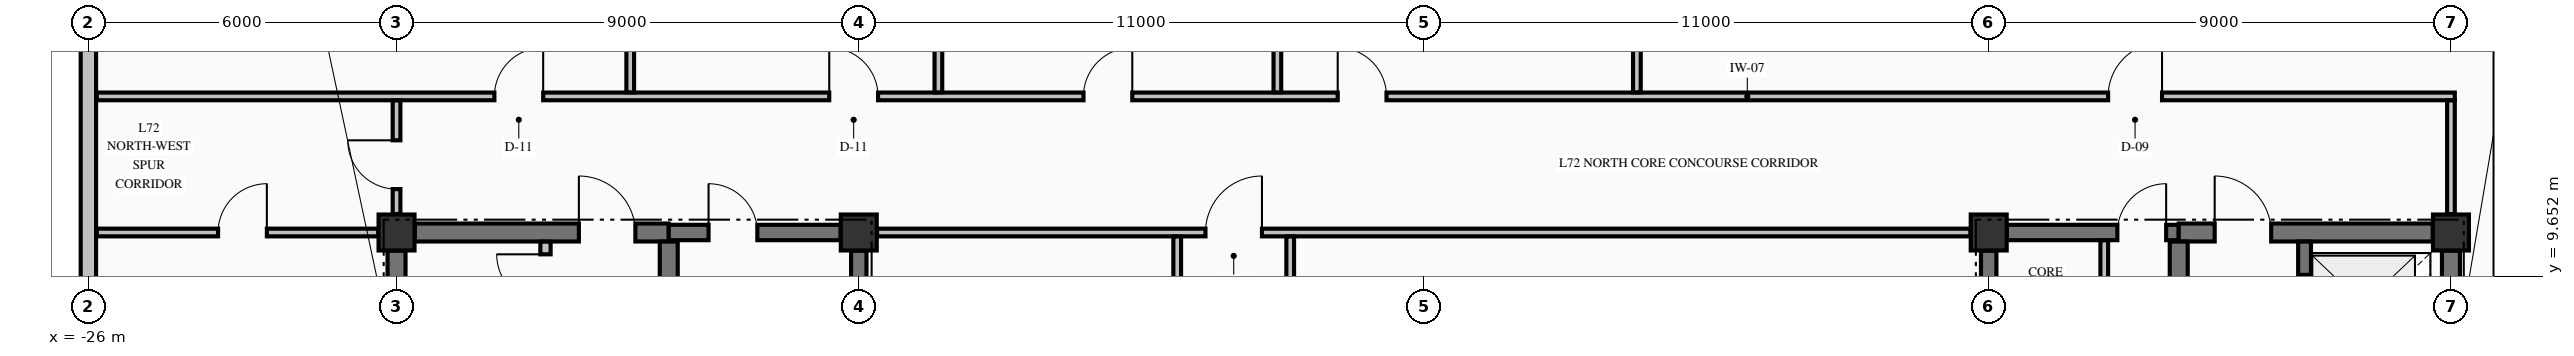
"""IFC4 building model, lengths in metres.
Left out: names, types, materials, properties, quantities, classifications, styles, units other than length and angle.
Written with IfcOpenShell. Run it as: python <this file> out.ifc"""

import sys

from ifc_helpers import new_model, si_unit, direction, frame, frame_2d, origin, origin_2d, place, context, subcontext, project, spatial, rectangle, extrude, element, fill, save


model = new_model("IFC4")
c1 = context("Model", 3, precision=1e-05, world=origin(), true_north=direction((0.0, 1.0)))
c2 = subcontext(c1, "Body", "Model", "MODEL_VIEW")
j1 = project(units=[si_unit("LENGTHUNIT", "METRE"), si_unit("PLANEANGLEUNIT", "RADIAN")], contexts=[c1])
p1 = place(None, origin())
s1 = spatial("IfcSite", under=j1, at=p1, CompositionType="ELEMENT")
p2 = place(p1, origin())
s2 = spatial("IfcBuilding", under=s1, at=p2, CompositionType="ELEMENT")
p3 = place(p2, frame((0.0, 0.0, 270.58)))
s3 = spatial("IfcBuildingStorey", under=s2, at=p3, CompositionType="ELEMENT", Elevation=270.58)
for number, where, z_axis, x_axis in (
    (1, (-20.0, 10.5, -0.325), (0.0, 0.0, 1.0), (1.0, 0.0, 0.0)),
    (2, (-11.0, 10.5, -0.325), (0.0, 0.0, 1.0), (1.0, 0.0, 0.0)),
    (3, (11.0, 10.5, -0.325), (0.0, 0.0, 1.0), (1.0, 0.0, 0.0)),
    (4, (20.0, 10.5, -0.325), (0.0, 0.0, 1.0), (1.0, 0.0, 0.0)),
):
    element("IfcColumn", number, at=place(p3, frame(where, z_axis=z_axis, x_axis=x_axis)), inside=s3, PredefinedType="COLUMN", context=c2, shape_type="SweptSolid", body=[
        extrude(rectangle(XDim=0.7, YDim=0.7, at=origin_2d()), origin(), (0.0, 0.0, 1.0), 3.815),
    ])
for number, where, z_axis, x_axis in (
    (5, (21.0, 9.455, 0.0), (0.0, 0.0, 1.0), (0.0, 1.0, 0.0)),
    (6, (-26.0, 17.545, 0.0), (0.0, 0.0, 1.0), (0.0, -1.0, 0.0)),
):
    element("IfcWall", number, at=place(p3, frame(where, z_axis=z_axis, x_axis=x_axis)), inside=s3, PredefinedType="STANDARD", context=c2, shape_type="SweptSolid", body=[
        extrude(rectangle(XDim=8.09, YDim=0.3, at=frame_2d((4.045, 0.0))), origin(), (0.0, 0.0, 1.0), 2.882),
    ])
p4 = place(p3, frame((-19.646, 10.5, 0.0), z_axis=(0.0, 0.0, 1.0), x_axis=(1.0, 0.0, 0.0)))
e7 = element("IfcWall", 7, at=p4, inside=s3, PredefinedType="SHEAR", context=c2, shape_type="SweptSolid", body=[
    extrude(rectangle(XDim=4.946, YDim=0.35, at=frame_2d((2.473, 0.0))), origin(), (0.0, 0.0, 1.0), 3.49),
])
p5 = place(p4, frame((3.196, 0.0, 0.0)))
e8 = element("IfcOpeningElement", 8, at=p5, cuts=e7, PredefinedType="OPENING", context=c2, shape_type="SweptSolid", body=[
    extrude(rectangle(XDim=1.1, YDim=2.15, at=frame_2d((0.55, 1.075))), frame((0.0, 0.185, 0.0), z_axis=(0.0, -1.0, 0.0), x_axis=(1.0, 0.0, 0.0)), (0.0, 0.0, 1.0), 0.37),
])
p6 = place(p3, frame((-14.7, 10.5, 0.0), z_axis=(0.0, 0.0, 1.0), x_axis=(1.0, 0.0, 0.0)))
e9 = element("IfcWall", 9, at=p6, inside=s3, PredefinedType="SHEAR", context=c2, shape_type="SweptSolid", body=[
    extrude(rectangle(XDim=3.346, YDim=0.3, at=frame_2d((1.673, 0.0))), origin(), (0.0, 0.0, 1.0), 3.49),
])
p7 = place(p6, frame((0.775, 0.0, 0.0)))
e10 = element("IfcOpeningElement", 10, at=p7, cuts=e9, PredefinedType="OPENING", context=c2, shape_type="SweptSolid", body=[
    extrude(rectangle(XDim=0.95, YDim=2.15, at=frame_2d((0.475, 1.075))), frame((0.0, 0.16, 0.0), z_axis=(0.0, -1.0, 0.0), x_axis=(1.0, 0.0, 0.0)), (0.0, 0.0, 1.0), 0.32),
])
p8 = place(p3, frame((11.354, 10.5, 0.0), z_axis=(0.0, 0.0, 1.0), x_axis=(1.0, 0.0, 0.0)))
e11 = element("IfcWall", 11, at=p8, inside=s3, PredefinedType="SHEAR", context=c2, shape_type="SweptSolid", body=[
    extrude(rectangle(XDim=3.346, YDim=0.3, at=frame_2d((1.673, 0.0))), origin(), (0.0, 0.0, 1.0), 3.49),
])
p9 = place(p8, frame((2.151, 0.0, 0.0)))
e12 = element("IfcOpeningElement", 12, at=p9, cuts=e11, PredefinedType="OPENING", context=c2, shape_type="SweptSolid", body=[
    extrude(rectangle(XDim=0.95, YDim=2.15, at=frame_2d((0.475, 1.075))), frame((0.0, 0.16, 0.0), z_axis=(0.0, -1.0, 0.0), x_axis=(1.0, 0.0, 0.0)), (0.0, 0.0, 1.0), 0.32),
])
p10 = place(p3, frame((14.7, 10.5, 0.0), z_axis=(0.0, 0.0, 1.0), x_axis=(1.0, 0.0, 0.0)))
e13 = element("IfcWall", 13, at=p10, inside=s3, PredefinedType="SHEAR", context=c2, shape_type="SweptSolid", body=[
    extrude(rectangle(XDim=4.946, YDim=0.35, at=frame_2d((2.473, 0.0))), origin(), (0.0, 0.0, 1.0), 3.49),
])
p11 = place(p10, frame((0.7, 0.0, 0.0)))
e14 = element("IfcOpeningElement", 14, at=p11, cuts=e13, PredefinedType="OPENING", context=c2, shape_type="SweptSolid", body=[
    extrude(rectangle(XDim=1.1, YDim=2.15, at=frame_2d((0.55, 1.075))), frame((0.0, 0.185, 0.0), z_axis=(0.0, -1.0, 0.0), x_axis=(1.0, 0.0, 0.0)), (0.0, 0.0, 1.0), 0.37),
])
p12 = place(p3, frame((-25.835, 10.5, 0.0), z_axis=(0.0, 0.0, 1.0), x_axis=(1.0, 0.0, 0.0)))
e15 = element("IfcWall", 15, at=p12, inside=s3, PredefinedType="PARTITIONING", context=c2, shape_type="SweptSolid", body=[
    extrude(rectangle(XDim=5.479, YDim=0.15, at=frame_2d((2.74, 0.0))), origin(), (0.0, 0.0, 1.0), 3.49),
])
p13 = place(p12, frame((2.36, 0.0, 0.0)))
e16 = element("IfcOpeningElement", 16, at=p13, cuts=e15, PredefinedType="OPENING", context=c2, shape_type="SweptSolid", body=[
    extrude(rectangle(XDim=0.95, YDim=2.15, at=frame_2d((0.475, 1.075))), frame((0.0, 0.085, 0.0), z_axis=(0.0, -1.0, 0.0), x_axis=(1.0, 0.0, 0.0)), (0.0, 0.0, 1.0), 0.17),
])
p14 = place(p3, frame((-10.644, 10.5, 0.0), z_axis=(0.0, 0.0, 1.0), x_axis=(1.0, 0.0, 0.0)))
e17 = element("IfcWall", 17, at=p14, inside=s3, PredefinedType="PARTITIONING", context=c2, shape_type="SweptSolid", body=[
    extrude(rectangle(XDim=21.288, YDim=0.15, at=frame_2d((10.644, 0.0))), origin(), (0.0, 0.0, 1.0), 3.49),
])
p15 = place(p14, frame((6.394, 0.0, 0.0)))
e18 = element("IfcOpeningElement", 18, at=p15, cuts=e17, PredefinedType="OPENING", context=c2, shape_type="SweptSolid", body=[
    extrude(rectangle(XDim=1.1, YDim=2.15, at=frame_2d((0.55, 1.075))), frame((0.0, 0.085, 0.0), z_axis=(0.0, -1.0, 0.0), x_axis=(1.0, 0.0, 0.0)), (0.0, 0.0, 1.0), 0.17),
])
p16 = place(p3, frame((-25.835, 13.15, 0.0), z_axis=(0.0, 0.0, 1.0), x_axis=(1.0, 0.0, 0.0)))
e19 = element("IfcWall", 19, at=p16, inside=s3, PredefinedType="PARTITIONING", context=c2, shape_type="SweptSolid", body=[
    extrude(rectangle(XDim=45.91, YDim=0.15, at=frame_2d((22.955, 0.0))), origin(), (0.0, 0.0, 1.0), 3.49),
])
p17 = place(p16, frame((7.74, 0.0, 0.0)))
e20 = element("IfcOpeningElement", 20, at=p17, cuts=e19, PredefinedType="OPENING", context=c2, shape_type="SweptSolid", body=[
    extrude(rectangle(XDim=0.95, YDim=2.15, at=frame_2d((0.475, 1.075))), frame((0.0, 0.085, 0.0), z_axis=(0.0, -1.0, 0.0), x_axis=(1.0, 0.0, 0.0)), (0.0, 0.0, 1.0), 0.17),
])
p18 = place(p16, frame((14.26, 0.0, 0.0)))
e21 = element("IfcOpeningElement", 21, at=p18, cuts=e19, PredefinedType="OPENING", context=c2, shape_type="SweptSolid", body=[
    extrude(rectangle(XDim=0.95, YDim=2.15, at=frame_2d((0.475, 1.075))), frame((0.0, 0.085, 0.0), z_axis=(0.0, -1.0, 0.0), x_axis=(1.0, 0.0, 0.0)), (0.0, 0.0, 1.0), 0.17),
])
p19 = place(p16, frame((19.21, 0.0, 0.0)))
e22 = element("IfcOpeningElement", 22, at=p19, cuts=e19, PredefinedType="OPENING", context=c2, shape_type="SweptSolid", body=[
    extrude(rectangle(XDim=0.95, YDim=2.15, at=frame_2d((0.475, 1.075))), frame((0.0, 0.085, 0.0), z_axis=(0.0, -1.0, 0.0), x_axis=(1.0, 0.0, 0.0)), (0.0, 0.0, 1.0), 0.17),
])
p20 = place(p16, frame((24.16, 0.0, 0.0)))
e23 = element("IfcOpeningElement", 23, at=p20, cuts=e19, PredefinedType="OPENING", context=c2, shape_type="SweptSolid", body=[
    extrude(rectangle(XDim=0.95, YDim=2.15, at=frame_2d((0.475, 1.075))), frame((0.0, 0.085, 0.0), z_axis=(0.0, -1.0, 0.0), x_axis=(1.0, 0.0, 0.0)), (0.0, 0.0, 1.0), 0.17),
])
p21 = place(p16, frame((39.16, 0.0, 0.0)))
e24 = element("IfcOpeningElement", 24, at=p21, cuts=e19, PredefinedType="OPENING", context=c2, shape_type="SweptSolid", body=[
    extrude(rectangle(XDim=1.05, YDim=2.15, at=frame_2d((0.525, 1.075))), frame((0.0, 0.085, 0.0), z_axis=(0.0, -1.0, 0.0), x_axis=(1.0, 0.0, 0.0)), (0.0, 0.0, 1.0), 0.17),
])
p22 = place(p3, frame((-20.0, 5.327, 0.0), z_axis=(0.0, 0.0, 1.0), x_axis=(0.0, 1.0, 0.0)))
e25 = element("IfcWall", 25, at=p22, inside=s3, PredefinedType="SHEAR", context=c2, shape_type="SweptSolid", body=[
    extrude(rectangle(XDim=4.819, YDim=0.35, at=frame_2d((2.41, 0.0))), origin(), (0.0, 0.0, 1.0), 3.49),
])
p23 = place(p3, frame((-14.7, 5.852, 0.0), z_axis=(0.0, 0.0, 1.0), x_axis=(0.0, 1.0, 0.0)))
e26 = element("IfcWall", 26, at=p23, inside=s3, PredefinedType="SHEAR", context=c2, shape_type="SweptSolid", body=[
    extrude(rectangle(XDim=4.471, YDim=0.35, at=frame_2d((2.235, 0.0))), origin(), (0.0, 0.0, 1.0), 3.49),
])
for number, where, z_axis, x_axis in (
    (27, (-11.0, 5.852, 0.0), (0.0, 0.0, 1.0), (0.0, 1.0, 0.0)),
    (28, (11.0, 5.852, 0.0), (0.0, 0.0, 1.0), (0.0, 1.0, 0.0)),
):
    element("IfcWall", number, at=place(p3, frame(where, z_axis=z_axis, x_axis=x_axis)), inside=s3, PredefinedType="SHEAR", context=c2, shape_type="SweptSolid", body=[
        extrude(rectangle(XDim=4.294, YDim=0.3, at=frame_2d((2.147, 0.0))), origin(), (0.0, 0.0, 1.0), 3.49),
    ])
p24 = place(p3, frame((14.7, 5.852, 0.0), z_axis=(0.0, 0.0, 1.0), x_axis=(0.0, 1.0, 0.0)))
e29 = element("IfcWall", 29, at=p24, inside=s3, PredefinedType="SHEAR", context=c2, shape_type="SweptSolid", body=[
    extrude(rectangle(XDim=4.471, YDim=0.35, at=frame_2d((2.235, 0.0))), origin(), (0.0, 0.0, 1.0), 3.49),
])
p25 = place(p3, frame((17.15, 7.877, 0.0), z_axis=(0.0, 0.0, 1.0), x_axis=(0.0, 1.0, 0.0)))
e30 = element("IfcWall", 30, at=p25, inside=s3, PredefinedType="SOLIDWALL", context=c2, shape_type="SweptSolid", body=[
    extrude(rectangle(XDim=2.446, YDim=0.25, at=frame_2d((1.223, 0.0))), origin(), (0.0, 0.0, 1.0), 3.49),
])
p26 = place(p25, frame((0.698, 0.0, 0.0)))
e31 = element("IfcOpeningElement", 31, at=p26, cuts=e30, PredefinedType="OPENING", context=c2, shape_type="SweptSolid", body=[
    extrude(rectangle(XDim=1.1, YDim=2.2, at=frame_2d((0.55, 1.1))), frame((0.0, 0.135, 0.0), z_axis=(0.0, -1.0, 0.0), x_axis=(1.0, 0.0, 0.0)), (0.0, 0.0, 1.0), 0.27),
])
p27 = place(p3, frame((20.0, 7.877, 0.0), z_axis=(0.0, 0.0, 1.0), x_axis=(0.0, 1.0, 0.0)))
e32 = element("IfcWall", 32, at=p27, inside=s3, PredefinedType="SHEAR", context=c2, shape_type="SweptSolid", body=[
    extrude(rectangle(XDim=2.269, YDim=0.35, at=frame_2d((1.135, 0.0))), origin(), (0.0, 0.0, 1.0), 3.49),
])
p28 = place(p3, frame((-20.0, 10.856, 0.0), z_axis=(0.0, 0.0, 1.0), x_axis=(0.0, 1.0, 0.0)))
e33 = element("IfcWall", 33, at=p28, inside=s3, PredefinedType="PARTITIONING", context=c2, shape_type="SweptSolid", body=[
    extrude(rectangle(XDim=2.216, YDim=0.15, at=frame_2d((1.108, 0.0))), origin(), (0.0, 0.0, 1.0), 3.49),
])
p29 = place(p28, frame((0.489, 0.0, 0.0)))
e34 = element("IfcOpeningElement", 34, at=p29, cuts=e33, PredefinedType="OPENING", context=c2, shape_type="SweptSolid", body=[
    extrude(rectangle(XDim=0.95, YDim=2.15, at=frame_2d((0.475, 1.075))), frame((0.0, 0.085, 0.0), z_axis=(0.0, -1.0, 0.0), x_axis=(1.0, 0.0, 0.0)), (0.0, 0.0, 1.0), 0.17),
])
p30 = place(p3, frame((-17.1, 8.778, 0.0), z_axis=(0.0, 0.0, 1.0), x_axis=(0.0, 1.0, 0.0)))
e35 = element("IfcWall", 35, at=p30, inside=s3, PredefinedType="PARTITIONING", context=c2, shape_type="SweptSolid", body=[
    extrude(rectangle(XDim=1.544, YDim=0.2, at=frame_2d((0.772, 0.0))), origin(), (0.0, 0.0, 1.0), 3.49),
])
p31 = place(p30, frame((0.347, 0.0, 0.0)))
e36 = element("IfcOpeningElement", 36, at=p31, cuts=e35, PredefinedType="OPENING", context=c2, shape_type="SweptSolid", body=[
    extrude(rectangle(XDim=0.95, YDim=2.15, at=frame_2d((0.475, 1.075))), frame((0.0, 0.11, 0.0), z_axis=(0.0, -1.0, 0.0), x_axis=(1.0, 0.0, 0.0)), (0.0, 0.0, 1.0), 0.22),
])
for number, where, z_axis, x_axis in (
    (37, (-15.45, 13.228, 0.0), (0.0, 0.0, 1.0), (0.0, 1.0, 0.0)),
    (38, (-9.45, 13.228, 0.0), (0.0, 0.0, 1.0), (0.0, 1.0, 0.0)),
):
    element("IfcWall", number, at=place(p3, frame(where, z_axis=z_axis, x_axis=x_axis)), inside=s3, PredefinedType="PARTITIONING", context=c2, shape_type="SweptSolid", body=[
        extrude(rectangle(XDim=10.107, YDim=0.15, at=frame_2d((5.053, 0.0))), origin(), (0.0, 0.0, 1.0), 3.49),
    ])
p32 = place(p3, frame((-4.8, 2.978, 0.0), z_axis=(0.0, 0.0, 1.0), x_axis=(0.0, 1.0, 0.0)))
e39 = element("IfcWall", 39, at=p32, inside=s3, PredefinedType="PARTITIONING", context=c2, shape_type="SweptSolid", body=[
    extrude(rectangle(XDim=7.444, YDim=0.15, at=frame_2d((3.722, 0.0))), origin(), (0.0, 0.0, 1.0), 3.49),
])
p33 = place(p3, frame((-2.85, 13.228, 0.0), z_axis=(0.0, 0.0, 1.0), x_axis=(0.0, 1.0, 0.0)))
e40 = element("IfcWall", 40, at=p33, inside=s3, PredefinedType="PARTITIONING", context=c2, shape_type="SweptSolid", body=[
    extrude(rectangle(XDim=10.107, YDim=0.15, at=frame_2d((5.053, 0.0))), origin(), (0.0, 0.0, 1.0), 3.49),
])
p34 = place(p3, frame((-2.6, 2.978, 0.0), z_axis=(0.0, 0.0, 1.0), x_axis=(0.0, 1.0, 0.0)))
e41 = element("IfcWall", 41, at=p34, inside=s3, PredefinedType="PARTITIONING", context=c2, shape_type="SweptSolid", body=[
    extrude(rectangle(XDim=7.444, YDim=0.15, at=frame_2d((3.722, 0.0))), origin(), (0.0, 0.0, 1.0), 3.49),
])
p35 = place(p3, frame((4.15, 13.228, 0.0), z_axis=(0.0, 0.0, 1.0), x_axis=(0.0, 1.0, 0.0)))
e42 = element("IfcWall", 42, at=p35, inside=s3, PredefinedType="PARTITIONING", context=c2, shape_type="SweptSolid", body=[
    extrude(rectangle(XDim=10.107, YDim=0.15, at=frame_2d((5.053, 0.0))), origin(), (0.0, 0.0, 1.0), 3.49),
])
p36 = place(p3, frame((13.25, 5.853, 0.0), z_axis=(0.0, 0.0, 1.0), x_axis=(0.0, 1.0, 0.0)))
e43 = element("IfcWall", 43, at=p36, inside=s3, PredefinedType="PARTITIONING", context=c2, shape_type="SweptSolid", body=[
    extrude(rectangle(XDim=4.494, YDim=0.15, at=frame_2d((2.247, 0.0))), origin(), (0.0, 0.0, 1.0), 3.49),
])
p37 = place(p36, frame((1.472, 0.0, 0.0)))
e44 = element("IfcOpeningElement", 44, at=p37, cuts=e43, PredefinedType="OPENING", context=c2, shape_type="SweptSolid", body=[
    extrude(rectangle(XDim=0.95, YDim=2.15, at=frame_2d((0.475, 1.075))), frame((0.0, 0.085, 0.0), z_axis=(0.0, -1.0, 0.0), x_axis=(1.0, 0.0, 0.0)), (0.0, 0.0, 1.0), 0.17),
])
p38 = place(p3, frame((20.0, 10.856, 0.0), z_axis=(0.0, 0.0, 1.0), x_axis=(0.0, 1.0, 0.0)))
e45 = element("IfcWall", 45, at=p38, inside=s3, PredefinedType="PARTITIONING", context=c2, shape_type="SweptSolid", body=[
    extrude(rectangle(XDim=2.216, YDim=0.15, at=frame_2d((1.108, 0.0))), origin(), (0.0, 0.0, 1.0), 3.08),
])
p39 = place(p7, origin())
e46 = element("IfcDoor", 46, at=p39, inside=s3, OperationType="SINGLE_SWING_LEFT", PredefinedType="DOOR", context=c2, shape_type="SweptSolid", body=[
    extrude(rectangle(XDim=0.95, YDim=2.15, at=frame_2d((0.475, 1.075))), frame((0.0, 0.025, 0.0), z_axis=(0.0, -1.0, 0.0), x_axis=(1.0, 0.0, 0.0)), (0.0, 0.0, 1.0), 0.05),
])
fill(e10, e46)
p40 = place(p9, origin())
e47 = element("IfcDoor", 47, at=p40, inside=s3, OperationType="SINGLE_SWING_RIGHT", PredefinedType="DOOR", context=c2, shape_type="SweptSolid", body=[
    extrude(rectangle(XDim=0.95, YDim=2.15, at=frame_2d((0.475, 1.075))), frame((0.0, 0.025, 0.0), z_axis=(0.0, -1.0, 0.0), x_axis=(1.0, 0.0, 0.0)), (0.0, 0.0, 1.0), 0.05),
])
fill(e12, e47)
p41 = place(p5, origin())
e48 = element("IfcDoor", 48, at=p41, inside=s3, OperationType="SINGLE_SWING_LEFT", PredefinedType="DOOR", context=c2, shape_type="SweptSolid", body=[
    extrude(rectangle(XDim=1.1, YDim=2.15, at=frame_2d((0.55, 1.075))), frame((0.0, 0.025, 0.0), z_axis=(0.0, -1.0, 0.0), x_axis=(1.0, 0.0, 0.0)), (0.0, 0.0, 1.0), 0.05),
])
fill(e8, e48)
p42 = place(p31, origin())
e49 = element("IfcDoor", 49, at=p42, inside=s3, OperationType="SINGLE_SWING_RIGHT", PredefinedType="DOOR", context=c2, shape_type="SweptSolid", body=[
    extrude(rectangle(XDim=0.95, YDim=2.15, at=frame_2d((0.475, 1.075))), frame((0.0, 0.025, 0.0), z_axis=(0.0, -1.0, 0.0), x_axis=(1.0, 0.0, 0.0)), (0.0, 0.0, 1.0), 0.05),
])
fill(e36, e49)
p43 = place(p26, origin())
e50 = element("IfcDoor", 50, at=p43, inside=s3, OperationType="SLIDING_TO_RIGHT", PredefinedType="DOOR", context=c2, shape_type="SweptSolid", body=[
    extrude(rectangle(XDim=1.1, YDim=2.2, at=frame_2d((0.55, 1.1))), frame((0.0, 0.025, 0.0), z_axis=(0.0, -1.0, 0.0), x_axis=(1.0, 0.0, 0.0)), (0.0, 0.0, 1.0), 0.05),
])
fill(e31, e50)
p44 = place(p11, origin())
e51 = element("IfcDoor", 51, at=p44, inside=s3, OperationType="SINGLE_SWING_LEFT", PredefinedType="DOOR", context=c2, shape_type="SweptSolid", body=[
    extrude(rectangle(XDim=1.1, YDim=2.15, at=frame_2d((0.55, 1.075))), frame((0.0, 0.025, 0.0), z_axis=(0.0, -1.0, 0.0), x_axis=(1.0, 0.0, 0.0)), (0.0, 0.0, 1.0), 0.05),
])
fill(e14, e51)
p45 = place(p15, origin())
e52 = element("IfcDoor", 52, at=p45, inside=s3, OperationType="SINGLE_SWING_RIGHT", PredefinedType="DOOR", context=c2, shape_type="SweptSolid", body=[
    extrude(rectangle(XDim=1.1, YDim=2.15, at=frame_2d((0.55, 1.075))), frame((0.0, 0.025, 0.0), z_axis=(0.0, -1.0, 0.0), x_axis=(1.0, 0.0, 0.0)), (0.0, 0.0, 1.0), 0.05),
])
fill(e18, e52)
p46 = place(p17, origin())
e53 = element("IfcDoor", 53, at=p46, inside=s3, OperationType="SINGLE_SWING_RIGHT", PredefinedType="DOOR", context=c2, shape_type="SweptSolid", body=[
    extrude(rectangle(XDim=0.95, YDim=2.15, at=frame_2d((0.475, 1.075))), frame((0.0, 0.025, 0.0), z_axis=(0.0, -1.0, 0.0), x_axis=(1.0, 0.0, 0.0)), (0.0, 0.0, 1.0), 0.05),
])
fill(e20, e53)
p47 = place(p18, origin())
e54 = element("IfcDoor", 54, at=p47, inside=s3, OperationType="SINGLE_SWING_LEFT", PredefinedType="DOOR", context=c2, shape_type="SweptSolid", body=[
    extrude(rectangle(XDim=0.95, YDim=2.15, at=frame_2d((0.475, 1.075))), frame((0.0, 0.025, 0.0), z_axis=(0.0, -1.0, 0.0), x_axis=(1.0, 0.0, 0.0)), (0.0, 0.0, 1.0), 0.05),
])
fill(e21, e54)
p48 = place(p19, origin())
e55 = element("IfcDoor", 55, at=p48, inside=s3, OperationType="SINGLE_SWING_RIGHT", PredefinedType="DOOR", context=c2, shape_type="SweptSolid", body=[
    extrude(rectangle(XDim=0.95, YDim=2.15, at=frame_2d((0.475, 1.075))), frame((0.0, 0.025, 0.0), z_axis=(0.0, -1.0, 0.0), x_axis=(1.0, 0.0, 0.0)), (0.0, 0.0, 1.0), 0.05),
])
fill(e22, e55)
p49 = place(p20, origin())
e56 = element("IfcDoor", 56, at=p49, inside=s3, OperationType="SINGLE_SWING_LEFT", PredefinedType="DOOR", context=c2, shape_type="SweptSolid", body=[
    extrude(rectangle(XDim=0.95, YDim=2.15, at=frame_2d((0.475, 1.075))), frame((0.0, 0.025, 0.0), z_axis=(0.0, -1.0, 0.0), x_axis=(1.0, 0.0, 0.0)), (0.0, 0.0, 1.0), 0.05),
])
fill(e23, e56)
p50 = place(p21, origin())
e57 = element("IfcDoor", 57, at=p50, inside=s3, OperationType="SINGLE_SWING_RIGHT", PredefinedType="DOOR", context=c2, shape_type="SweptSolid", body=[
    extrude(rectangle(XDim=1.05, YDim=2.15, at=frame_2d((0.525, 1.075))), frame((0.0, 0.025, 0.0), z_axis=(0.0, -1.0, 0.0), x_axis=(1.0, 0.0, 0.0)), (0.0, 0.0, 1.0), 0.05),
])
fill(e24, e57)
p51 = place(p29, origin())
e58 = element("IfcDoor", 58, at=p51, inside=s3, OperationType="SINGLE_SWING_RIGHT", PredefinedType="DOOR", context=c2, shape_type="SweptSolid", body=[
    extrude(rectangle(XDim=0.95, YDim=2.15, at=frame_2d((0.475, 1.075))), frame((0.0, 0.025, 0.0), z_axis=(0.0, -1.0, 0.0), x_axis=(1.0, 0.0, 0.0)), (0.0, 0.0, 1.0), 0.05),
])
fill(e34, e58)
p52 = place(p13, origin())
e59 = element("IfcDoor", 59, at=p52, inside=s3, OperationType="SINGLE_SWING_RIGHT", PredefinedType="DOOR", context=c2, shape_type="SweptSolid", body=[
    extrude(rectangle(XDim=0.95, YDim=2.15, at=frame_2d((0.475, 1.075))), frame((0.0, 0.025, 0.0), z_axis=(0.0, -1.0, 0.0), x_axis=(1.0, 0.0, 0.0)), (0.0, 0.0, 1.0), 0.05),
])
fill(e16, e59)
save(model, sys.argv[1])
